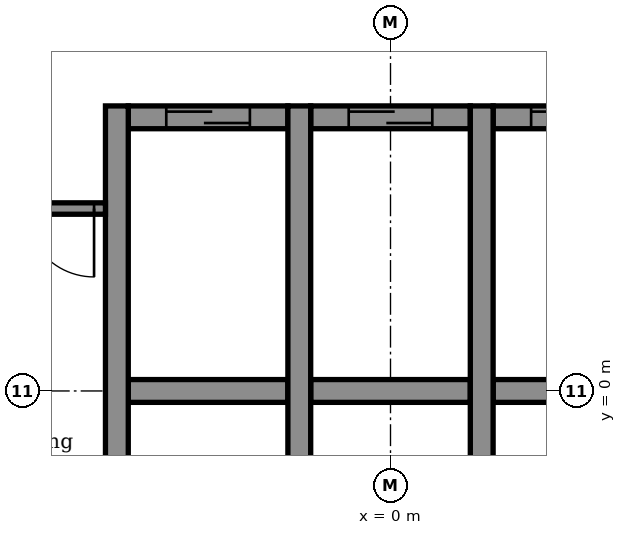
"""IFC4 building model, lengths in metres.
Left out: names, types, materials, properties, quantities, classifications, styles, units other than length and angle.
Written with IfcOpenShell. Run it as: python <this file> out.ifc"""

import sys

from ifc_helpers import new_model, si_unit, direction, frame, frame_2d, origin, place, context, subcontext, project, spatial, rectangle, extrude, element, fill, save


model = new_model("IFC4")
c1 = context("Model", 3, precision=1e-05, world=origin(), true_north=direction((0.0, 1.0)))
c2 = subcontext(c1, "Body", "Model", "MODEL_VIEW")
j1 = project(units=[si_unit("LENGTHUNIT", "METRE"), si_unit("PLANEANGLEUNIT", "RADIAN")], contexts=[c1])
p1 = place(None, origin())
s1 = spatial("IfcSite", under=j1, at=p1, CompositionType="ELEMENT")
p2 = place(p1, origin())
s2 = spatial("IfcBuilding", under=s1, at=p2, CompositionType="ELEMENT")
p3 = place(p2, frame((0.0, 0.0, 185.6)))
s3 = spatial("IfcBuildingStorey", under=s2, at=p3, CompositionType="ELEMENT", Elevation=185.6)
p4 = place(p3, frame((-3.45, 0.0, -0.15), z_axis=(0.0, 0.0, 1.0), x_axis=(1.0, 0.0, 0.0)))
e1 = element("IfcWall", 1, at=p4, inside=s3, PredefinedType="STANDARD", context=c2, shape_type="SweptSolid", body=[
    extrude(rectangle(XDim=2.1, YDim=0.3, at=frame_2d((1.05, 0.0))), origin(), (0.0, 0.0, 1.0), 3.9),
])
p5 = place(p3, frame((-1.05, 0.0, -0.15), z_axis=(0.0, 0.0, 1.0), x_axis=(1.0, 0.0, 0.0)))
e2 = element("IfcWall", 2, at=p5, inside=s3, PredefinedType="STANDARD", context=c2, shape_type="SweptSolid", body=[
    extrude(rectangle(XDim=2.1, YDim=0.3, at=frame_2d((1.05, 0.0))), origin(), (0.0, 0.0, 1.0), 3.9),
])
p6 = place(p3, frame((1.35, 0.0, -0.15), z_axis=(0.0, 0.0, 1.0), x_axis=(1.0, 0.0, 0.0)))
e3 = element("IfcWall", 3, at=p6, inside=s3, PredefinedType="STANDARD", context=c2, shape_type="SweptSolid", body=[
    extrude(rectangle(XDim=2.1, YDim=0.3, at=frame_2d((1.05, 0.0))), origin(), (0.0, 0.0, 1.0), 3.9),
])
p7 = place(p3, frame((-3.45, 3.6, -0.15), z_axis=(0.0, 0.0, 1.0), x_axis=(1.0, 0.0, 0.0)))
e4 = element("IfcWall", 4, at=p7, inside=s3, PredefinedType="STANDARD", context=c2, shape_type="SweptSolid", body=[
    extrude(rectangle(XDim=2.1, YDim=0.3, at=frame_2d((1.05, 0.0))), origin(), (0.0, 0.0, 1.0), 3.9),
])
p8 = place(p7, frame((0.5, 0.0, 0.15)))
e5 = element("IfcOpeningElement", 5, at=p8, cuts=e4, PredefinedType="OPENING", context=c2, shape_type="SweptSolid", body=[
    extrude(rectangle(XDim=1.1, YDim=2.1, at=frame_2d((0.55, 1.05))), frame((0.0, 0.16, 0.0), z_axis=(0.0, -1.0, 0.0), x_axis=(1.0, 0.0, 0.0)), (0.0, 0.0, 1.0), 0.32),
])
p9 = place(p3, frame((-1.05, 3.6, -0.15), z_axis=(0.0, 0.0, 1.0), x_axis=(1.0, 0.0, 0.0)))
e6 = element("IfcWall", 6, at=p9, inside=s3, PredefinedType="STANDARD", context=c2, shape_type="SweptSolid", body=[
    extrude(rectangle(XDim=2.1, YDim=0.3, at=frame_2d((1.05, 0.0))), origin(), (0.0, 0.0, 1.0), 3.9),
])
p10 = place(p9, frame((0.5, 0.0, 0.15)))
e7 = element("IfcOpeningElement", 7, at=p10, cuts=e6, PredefinedType="OPENING", context=c2, shape_type="SweptSolid", body=[
    extrude(rectangle(XDim=1.1, YDim=2.1, at=frame_2d((0.55, 1.05))), frame((0.0, 0.16, 0.0), z_axis=(0.0, -1.0, 0.0), x_axis=(1.0, 0.0, 0.0)), (0.0, 0.0, 1.0), 0.32),
])
p11 = place(p3, frame((1.35, 3.6, -0.15), z_axis=(0.0, 0.0, 1.0), x_axis=(1.0, 0.0, 0.0)))
e8 = element("IfcWall", 8, at=p11, inside=s3, PredefinedType="STANDARD", context=c2, shape_type="SweptSolid", body=[
    extrude(rectangle(XDim=2.1, YDim=0.3, at=frame_2d((1.05, 0.0))), origin(), (0.0, 0.0, 1.0), 3.9),
])
p12 = place(p11, frame((0.5, 0.0, 0.15)))
e9 = element("IfcOpeningElement", 9, at=p12, cuts=e8, PredefinedType="OPENING", context=c2, shape_type="SweptSolid", body=[
    extrude(rectangle(XDim=1.1, YDim=2.1, at=frame_2d((0.55, 1.05))), frame((0.0, 0.16, 0.0), z_axis=(0.0, -1.0, 0.0), x_axis=(1.0, 0.0, 0.0)), (0.0, 0.0, 1.0), 0.32),
])
for number, where, z_axis, x_axis in (
    (10, (-3.6, -3.75, -0.15), (0.0, 0.0, 1.0), (0.0, 1.0, 0.0)),
    (11, (-1.2, -3.75, -0.15), (0.0, 0.0, 1.0), (0.0, 1.0, 0.0)),
    (12, (1.2, -3.75, -0.15), (0.0, 0.0, 1.0), (0.0, 1.0, 0.0)),
):
    element("IfcWall", number, at=place(p3, frame(where, z_axis=z_axis, x_axis=x_axis)), inside=s3, PredefinedType="STANDARD", context=c2, shape_type="SweptSolid", body=[
        extrude(rectangle(XDim=7.5, YDim=0.3, at=frame_2d((3.75, 0.0))), origin(), (0.0, 0.0, 1.0), 3.9),
    ])
p13 = place(p3, frame((-4.95, 2.4, 0.0), z_axis=(0.0, 0.0, 1.0), x_axis=(1.0, 0.0, 0.0)))
e13 = element("IfcWall", 13, at=p13, inside=s3, PredefinedType="PARTITIONING", context=c2, shape_type="SweptSolid", body=[
    extrude(rectangle(XDim=1.2, YDim=0.15, at=frame_2d((0.6, 0.0))), origin(), (0.0, 0.0, 1.0), 3.75),
])
p14 = place(p13, frame((0.15, 0.0, 0.0)))
e14 = element("IfcOpeningElement", 14, at=p14, cuts=e13, PredefinedType="OPENING", context=c2, shape_type="SweptSolid", body=[
    extrude(rectangle(XDim=0.9, YDim=2.1, at=frame_2d((0.45, 1.05))), frame((0.0, 0.085, 0.0), z_axis=(0.0, -1.0, 0.0), x_axis=(1.0, 0.0, 0.0)), (0.0, 0.0, 1.0), 0.17),
])
p15 = place(p8, origin())
e15 = element("IfcDoor", 15, at=p15, inside=s3, OperationType="DOUBLE_DOOR_SLIDING", PredefinedType="DOOR", context=c2, shape_type="SweptSolid", body=[
    extrude(rectangle(XDim=1.1, YDim=2.1, at=frame_2d((0.55, 1.05))), frame((0.0, 0.025, 0.0), z_axis=(0.0, -1.0, 0.0), x_axis=(1.0, 0.0, 0.0)), (0.0, 0.0, 1.0), 0.05),
])
fill(e5, e15)
p16 = place(p10, origin())
e16 = element("IfcDoor", 16, at=p16, inside=s3, OperationType="DOUBLE_DOOR_SLIDING", PredefinedType="DOOR", context=c2, shape_type="SweptSolid", body=[
    extrude(rectangle(XDim=1.1, YDim=2.1, at=frame_2d((0.55, 1.05))), frame((0.0, 0.025, 0.0), z_axis=(0.0, -1.0, 0.0), x_axis=(1.0, 0.0, 0.0)), (0.0, 0.0, 1.0), 0.05),
])
fill(e7, e16)
p17 = place(p12, origin())
e17 = element("IfcDoor", 17, at=p17, inside=s3, OperationType="DOUBLE_DOOR_SLIDING", PredefinedType="DOOR", context=c2, shape_type="SweptSolid", body=[
    extrude(rectangle(XDim=1.1, YDim=2.1, at=frame_2d((0.55, 1.05))), frame((0.0, 0.025, 0.0), z_axis=(0.0, -1.0, 0.0), x_axis=(1.0, 0.0, 0.0)), (0.0, 0.0, 1.0), 0.05),
])
fill(e9, e17)
p18 = place(p14, frame((0.9, 0.0, 0.0), z_axis=(0.0, 0.0, 1.0), x_axis=(-1.0, 0.0, 0.0)))
e18 = element("IfcDoor", 18, at=p18, inside=s3, OperationType="SINGLE_SWING_RIGHT", PredefinedType="DOOR", context=c2, shape_type="SweptSolid", body=[
    extrude(rectangle(XDim=0.9, YDim=2.1, at=frame_2d((0.45, 1.05))), frame((0.0, 0.025, 0.0), z_axis=(0.0, -1.0, 0.0), x_axis=(1.0, 0.0, 0.0)), (0.0, 0.0, 1.0), 0.05),
])
fill(e14, e18)
save(model, sys.argv[1])
